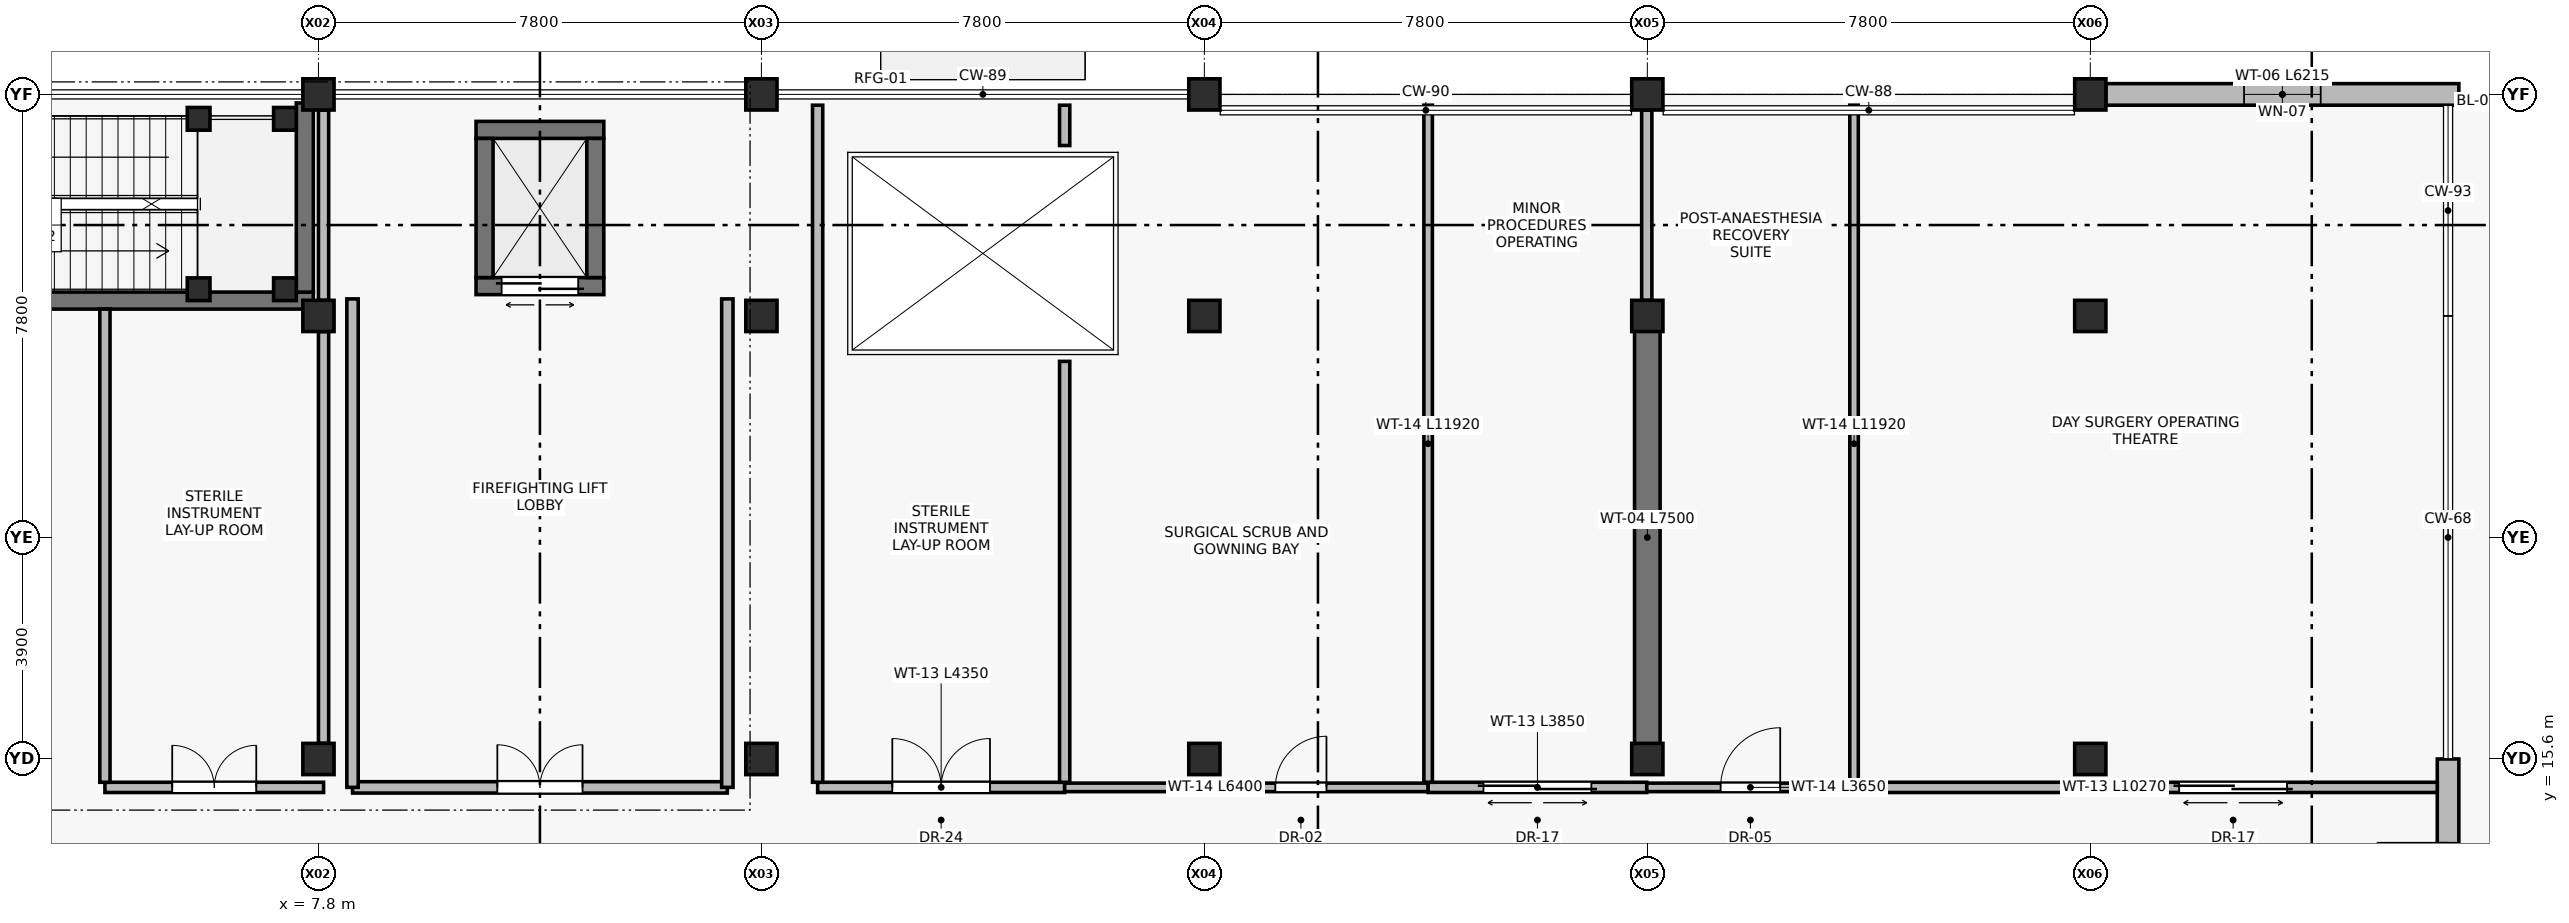
"""IFC4 building model, lengths in metres.
Left out: names, types, materials, properties, quantities, classifications, styles, units other than length and angle.
Written with IfcOpenShell. Run it as: python <this file> out.ifc"""

import sys

from ifc_helpers import new_model, si_unit, direction, frame, frame_2d, origin, origin_2d, place, context, subcontext, project, spatial, rectangle, extrude, element, fill, save


model = new_model("IFC4")
c1 = context("Model", 3, precision=1e-05, world=origin(), true_north=direction((0.0, 1.0)))
c2 = subcontext(c1, "Body", "Model", "MODEL_VIEW")
j1 = project(units=[si_unit("LENGTHUNIT", "METRE"), si_unit("PLANEANGLEUNIT", "RADIAN")], contexts=[c1])
p1 = place(None, origin())
s1 = spatial("IfcSite", under=j1, at=p1, CompositionType="ELEMENT")
p2 = place(p1, origin())
s2 = spatial("IfcBuilding", under=s1, at=p2, CompositionType="ELEMENT")
p3 = place(p2, frame((0.0, 0.0, 9.6)))
s3 = spatial("IfcBuildingStorey", under=s2, at=p3, CompositionType="ELEMENT", Elevation=9.6)
for number, where, z_axis, x_axis in (
    (1, (7.8, 15.6, 0.0), (0.0, 0.0, 1.0), (1.0, 0.0, 0.0)),
    (2, (7.8, 23.4, 0.0), (0.0, 0.0, 1.0), (1.0, 0.0, 0.0)),
    (3, (7.8, 27.3, 0.0), (0.0, 0.0, 1.0), (1.0, 0.0, 0.0)),
    (4, (15.6, 15.6, 0.0), (0.0, 0.0, 1.0), (1.0, 0.0, 0.0)),
    (5, (15.6, 23.4, 0.0), (0.0, 0.0, 1.0), (1.0, 0.0, 0.0)),
    (6, (15.6, 27.3, 0.0), (0.0, 0.0, 1.0), (1.0, 0.0, 0.0)),
    (7, (23.4, 15.6, 0.0), (0.0, 0.0, 1.0), (1.0, 0.0, 0.0)),
    (8, (23.4, 23.4, 0.0), (0.0, 0.0, 1.0), (1.0, 0.0, 0.0)),
    (9, (23.4, 27.3, 0.0), (0.0, 0.0, 1.0), (1.0, 0.0, 0.0)),
    (10, (31.2, 15.6, 0.0), (0.0, 0.0, 1.0), (1.0, 0.0, 0.0)),
    (11, (31.2, 23.4, 0.0), (0.0, 0.0, 1.0), (1.0, 0.0, 0.0)),
    (12, (31.2, 27.3, 0.0), (0.0, 0.0, 1.0), (1.0, 0.0, 0.0)),
    (13, (39.0, 15.6, 0.0), (0.0, 0.0, 1.0), (1.0, 0.0, 0.0)),
    (14, (39.0, 23.4, 0.0), (0.0, 0.0, 1.0), (1.0, 0.0, 0.0)),
    (15, (39.0, 27.3, 0.0), (0.0, 0.0, 1.0), (1.0, 0.0, 0.0)),
):
    element("IfcColumn", number, at=place(p3, frame(where, z_axis=z_axis, x_axis=x_axis)), inside=s3, PredefinedType="COLUMN", context=c2, shape_type="SweptSolid", body=[
        extrude(rectangle(XDim=0.55, YDim=0.55, at=origin_2d()), origin(), (0.0, 0.0, 1.0), 4.5),
    ])
for number, where, z_axis, x_axis in (
    (16, (5.69, 23.87, 0.0), (0.0, 0.0, 1.0), (1.0, 0.0, 0.0)),
    (17, (5.69, 26.87, 0.0), (0.0, 0.0, 1.0), (1.0, 0.0, 0.0)),
    (18, (7.21, 23.87, 0.0), (0.0, 0.0, 1.0), (1.0, 0.0, 0.0)),
    (19, (7.21, 26.87, 0.0), (0.0, 0.0, 1.0), (1.0, 0.0, 0.0)),
):
    element("IfcColumn", number, at=place(p3, frame(where, z_axis=z_axis, x_axis=x_axis)), inside=s3, PredefinedType="COLUMN", context=c2, shape_type="SweptSolid", body=[
        extrude(rectangle(XDim=0.4, YDim=0.4, at=origin_2d()), origin(), (0.0, 0.0, 1.0), 4.5),
    ])
p4 = place(p3, frame((39.275, 27.3, 0.0), z_axis=(0.0, 0.0, 1.0), x_axis=(1.0, 0.0, 0.0)))
e20 = element("IfcWall", 20, at=p4, inside=s3, PredefinedType="STANDARD", context=c2, shape_type="SweptSolid", body=[
    extrude(rectangle(XDim=6.215, YDim=0.38, at=frame_2d((3.107, 0.0))), origin(), (0.0, 0.0, 1.0), 3.84),
])
p5 = place(p4, frame((2.433, 0.0, 0.9)))
e21 = element("IfcOpeningElement", 21, at=p5, cuts=e20, PredefinedType="OPENING", context=c2, shape_type="SweptSolid", body=[
    extrude(rectangle(XDim=1.35, YDim=1.75, at=frame_2d((0.675, 0.875))), frame((0.0, 0.2, 0.0), z_axis=(0.0, -1.0, 0.0), x_axis=(1.0, 0.0, 0.0)), (0.0, 0.0, 1.0), 0.4),
])
p6 = place(p3, frame((45.3, 15.6, 0.0), z_axis=(0.0, 0.0, 1.0), x_axis=(0.0, -1.0, 0.0)))
e22 = element("IfcWall", 22, at=p6, inside=s3, PredefinedType="STANDARD", context=c2, shape_type="SweptSolid", body=[
    extrude(rectangle(XDim=7.8, YDim=0.38, at=frame_2d((3.9, 0.0))), origin(), (0.0, 0.0, 1.0), 4.24),
])
p7 = place(p6, frame((1.475, 0.0, 0.0)))
e23 = element("IfcOpeningElement", 23, at=p7, cuts=e22, PredefinedType="OPENING", context=c2, shape_type="SweptSolid", body=[
    extrude(rectangle(XDim=1.25, YDim=2.2, at=frame_2d((0.625, 1.1))), frame((0.0, 0.2, 0.0), z_axis=(0.0, -1.0, 0.0), x_axis=(1.0, 0.0, 0.0)), (0.0, 0.0, 1.0), 0.4),
])
p8 = place(p3, frame((0.15, 23.67, 0.0), z_axis=(0.0, 0.0, 1.0), x_axis=(1.0, 0.0, 0.0)))
e24 = element("IfcWall", 24, at=p8, inside=s3, PredefinedType="SHEAR", context=c2, shape_type="SweptSolid", body=[
    extrude(rectangle(XDim=7.56, YDim=0.3, at=frame_2d((3.78, 0.0))), origin(), (0.0, 0.0, 1.0), 4.24),
])
p9 = place(p8, frame((0.56, 0.0, 0.0)))
e25 = element("IfcOpeningElement", 25, at=p9, cuts=e24, PredefinedType="OPENING", context=c2, shape_type="SweptSolid", body=[
    extrude(rectangle(XDim=1.4, YDim=2.2, at=frame_2d((0.7, 1.1))), frame((0.0, 0.16, 0.0), z_axis=(0.0, -1.0, 0.0), x_axis=(1.0, 0.0, 0.0)), (0.0, 0.0, 1.0), 0.32),
])
p10 = place(p3, frame((7.56, 23.82, 0.0), z_axis=(0.0, 0.0, 1.0), x_axis=(0.0, 1.0, 0.0)))
e26 = element("IfcWall", 26, at=p10, inside=s3, PredefinedType="SHEAR", context=c2, shape_type="SweptSolid", body=[
    extrude(rectangle(XDim=3.33, YDim=0.3, at=frame_2d((1.665, 0.0))), origin(), (0.0, 0.0, 1.0), 4.24),
])
p11 = place(p3, frame((10.575, 23.925, 0.0), z_axis=(0.0, 0.0, 1.0), x_axis=(1.0, 0.0, 0.0)))
e27 = element("IfcWall", 27, at=p11, inside=s3, PredefinedType="SHEAR", context=c2, shape_type="SweptSolid", body=[
    extrude(rectangle(XDim=2.25, YDim=0.3, at=frame_2d((1.125, 0.0))), origin(), (0.0, 0.0, 1.0), 4.24),
])
p12 = place(p11, frame((0.45, 0.0, 0.0)))
e28 = element("IfcOpeningElement", 28, at=p12, cuts=e27, PredefinedType="OPENING", context=c2, shape_type="SweptSolid", body=[
    extrude(rectangle(XDim=1.35, YDim=2.3, at=frame_2d((0.675, 1.15))), frame((0.0, 0.16, 0.0), z_axis=(0.0, -1.0, 0.0), x_axis=(1.0, 0.0, 0.0)), (0.0, 0.0, 1.0), 0.32),
])
p13 = place(p3, frame((12.825, 26.675, 0.0), z_axis=(0.0, 0.0, 1.0), x_axis=(-1.0, 0.0, 0.0)))
e29 = element("IfcWall", 29, at=p13, inside=s3, PredefinedType="SHEAR", context=c2, shape_type="SweptSolid", body=[
    extrude(rectangle(XDim=2.25, YDim=0.3, at=frame_2d((1.125, 0.0))), origin(), (0.0, 0.0, 1.0), 4.24),
])
for number, where, z_axis, x_axis in (
    (30, (10.725, 26.525, 0.0), (0.0, 0.0, 1.0), (0.0, -1.0, 0.0)),
    (31, (12.675, 24.075, 0.0), (0.0, 0.0, 1.0), (0.0, 1.0, 0.0)),
):
    element("IfcWall", number, at=place(p3, frame(where, z_axis=z_axis, x_axis=x_axis)), inside=s3, PredefinedType="SHEAR", context=c2, shape_type="SweptSolid", body=[
        extrude(rectangle(XDim=2.45, YDim=0.3, at=frame_2d((1.225, 0.0))), origin(), (0.0, 0.0, 1.0), 4.24),
    ])
p14 = place(p3, frame((8.4, 15.1, 0.0), z_axis=(0.0, 0.0, 1.0), x_axis=(1.0, 0.0, 0.0)))
e32 = element("IfcWall", 32, at=p14, inside=s3, PredefinedType="SOLIDWALL", context=c2, shape_type="SweptSolid", body=[
    extrude(rectangle(XDim=6.6, YDim=0.2, at=frame_2d((3.3, 0.0))), origin(), (0.0, 0.0, 1.0), 4.24),
])
p15 = place(p14, frame((2.55, 0.0, 0.0)))
e33 = element("IfcOpeningElement", 33, at=p15, cuts=e32, PredefinedType="OPENING", context=c2, shape_type="SweptSolid", body=[
    extrude(rectangle(XDim=1.5, YDim=2.2, at=frame_2d((0.75, 1.1))), frame((0.0, 0.11, 0.0), z_axis=(0.0, -1.0, 0.0), x_axis=(1.0, 0.0, 0.0)), (0.0, 0.0, 1.0), 0.22),
])
for number, where, z_axis, x_axis in (
    (34, (8.4, 23.7, 0.0), (0.0, 0.0, 1.0), (0.0, -1.0, 0.0)),
    (35, (15.0, 15.1, 0.0), (0.0, 0.0, 1.0), (0.0, 1.0, 0.0)),
):
    element("IfcWall", number, at=place(p3, frame(where, z_axis=z_axis, x_axis=x_axis)), inside=s3, PredefinedType="SOLIDWALL", context=c2, shape_type="SweptSolid", body=[
        extrude(rectangle(XDim=8.6, YDim=0.2, at=frame_2d((4.3, 0.0))), origin(), (0.0, 0.0, 1.0), 4.24),
    ])
p16 = place(p3, frame((31.2, 15.75, 0.0), z_axis=(0.0, 0.0, 1.0), x_axis=(0.0, 1.0, 0.0)))
e36 = element("IfcWall", 36, at=p16, inside=s3, PredefinedType="SHEAR", context=c2, shape_type="SweptSolid", body=[
    extrude(rectangle(XDim=7.5, YDim=0.45, at=frame_2d((3.75, 0.0))), origin(), (0.0, 0.0, 1.0), 4.24),
])
p17 = place(p3, frame((4.04, 15.1, 0.0), z_axis=(0.0, 0.0, 1.0), x_axis=(1.0, 0.0, 0.0)))
e37 = element("IfcWall", 37, at=p17, inside=s3, PredefinedType="PARTITIONING", context=c2, shape_type="SweptSolid", body=[
    extrude(rectangle(XDim=3.85, YDim=0.18, at=frame_2d((1.925, 0.0))), origin(), (0.0, 0.0, 1.0), 4.24),
])
p18 = place(p17, frame((1.185, 0.0, 0.0)))
e38 = element("IfcOpeningElement", 38, at=p18, cuts=e37, PredefinedType="OPENING", context=c2, shape_type="SweptSolid", body=[
    extrude(rectangle(XDim=1.48, YDim=2.25, at=frame_2d((0.74, 1.125))), frame((0.0, 0.1, 0.0), z_axis=(0.0, -1.0, 0.0), x_axis=(1.0, 0.0, 0.0)), (0.0, 0.0, 1.0), 0.2),
])
p19 = place(p3, frame((16.59, 15.1, 0.0), z_axis=(0.0, 0.0, 1.0), x_axis=(1.0, 0.0, 0.0)))
e39 = element("IfcWall", 39, at=p19, inside=s3, PredefinedType="PARTITIONING", context=c2, shape_type="SweptSolid", body=[
    extrude(rectangle(XDim=4.35, YDim=0.18, at=frame_2d((2.175, 0.0))), origin(), (0.0, 0.0, 1.0), 4.24),
])
p20 = place(p19, frame((1.315, 0.0, 0.0)))
e40 = element("IfcOpeningElement", 40, at=p20, cuts=e39, PredefinedType="OPENING", context=c2, shape_type="SweptSolid", body=[
    extrude(rectangle(XDim=1.72, YDim=2.3, at=frame_2d((0.86, 1.15))), frame((0.0, 0.1, 0.0), z_axis=(0.0, -1.0, 0.0), x_axis=(1.0, 0.0, 0.0)), (0.0, 0.0, 1.0), 0.2),
])
p21 = place(p3, frame((20.94, 15.1, 0.0), z_axis=(0.0, 0.0, 1.0), x_axis=(1.0, 0.0, 0.0)))
e41 = element("IfcWall", 41, at=p21, inside=s3, PredefinedType="PARTITIONING", context=c2, shape_type="SweptSolid", body=[
    extrude(rectangle(XDim=6.4, YDim=0.15, at=frame_2d((3.2, 0.0))), origin(), (0.0, 0.0, 1.0), 4.24),
])
p22 = place(p21, frame((3.71, 0.0, 0.0)))
e42 = element("IfcOpeningElement", 42, at=p22, cuts=e41, PredefinedType="OPENING", context=c2, shape_type="SweptSolid", body=[
    extrude(rectangle(XDim=0.9, YDim=2.1, at=frame_2d((0.45, 1.05))), frame((0.0, 0.085, 0.0), z_axis=(0.0, -1.0, 0.0), x_axis=(1.0, 0.0, 0.0)), (0.0, 0.0, 1.0), 0.17),
])
p23 = place(p3, frame((27.34, 15.1, 0.0), z_axis=(0.0, 0.0, 1.0), x_axis=(1.0, 0.0, 0.0)))
e43 = element("IfcWall", 43, at=p23, inside=s3, PredefinedType="PARTITIONING", context=c2, shape_type="SweptSolid", body=[
    extrude(rectangle(XDim=3.85, YDim=0.18, at=frame_2d((1.925, 0.0))), origin(), (0.0, 0.0, 1.0), 4.24),
])
p24 = place(p23, frame((0.975, 0.0, 0.0)))
e44 = element("IfcOpeningElement", 44, at=p24, cuts=e43, PredefinedType="OPENING", context=c2, shape_type="SweptSolid", body=[
    extrude(rectangle(XDim=1.9, YDim=2.3, at=frame_2d((0.95, 1.15))), frame((0.0, 0.1, 0.0), z_axis=(0.0, -1.0, 0.0), x_axis=(1.0, 0.0, 0.0)), (0.0, 0.0, 1.0), 0.2),
])
p25 = place(p3, frame((31.19, 15.1, 0.0), z_axis=(0.0, 0.0, 1.0), x_axis=(1.0, 0.0, 0.0)))
e45 = element("IfcWall", 45, at=p25, inside=s3, PredefinedType="PARTITIONING", context=c2, shape_type="SweptSolid", body=[
    extrude(rectangle(XDim=3.65, YDim=0.15, at=frame_2d((1.825, 0.0))), origin(), (0.0, 0.0, 1.0), 4.24),
])
p26 = place(p25, frame((1.3, 0.0, 0.0)))
e46 = element("IfcOpeningElement", 46, at=p26, cuts=e45, PredefinedType="OPENING", context=c2, shape_type="SweptSolid", body=[
    extrude(rectangle(XDim=1.05, YDim=2.15, at=frame_2d((0.525, 1.075))), frame((0.0, 0.085, 0.0), z_axis=(0.0, -1.0, 0.0), x_axis=(1.0, 0.0, 0.0)), (0.0, 0.0, 1.0), 0.17),
])
p27 = place(p3, frame((34.84, 15.1, 0.0), z_axis=(0.0, 0.0, 1.0), x_axis=(1.0, 0.0, 0.0)))
e47 = element("IfcWall", 47, at=p27, inside=s3, PredefinedType="PARTITIONING", context=c2, shape_type="SweptSolid", body=[
    extrude(rectangle(XDim=10.27, YDim=0.18, at=frame_2d((5.135, 0.0))), origin(), (0.0, 0.0, 1.0), 4.24),
])
p28 = place(p27, frame((5.726, 0.0, 0.0)))
e48 = element("IfcOpeningElement", 48, at=p28, cuts=e47, PredefinedType="OPENING", context=c2, shape_type="SweptSolid", body=[
    extrude(rectangle(XDim=1.9, YDim=2.3, at=frame_2d((0.95, 1.15))), frame((0.0, 0.1, 0.0), z_axis=(0.0, -1.0, 0.0), x_axis=(1.0, 0.0, 0.0)), (0.0, 0.0, 1.0), 0.2),
])
p29 = place(p3, frame((4.04, 15.19, 0.0), z_axis=(0.0, 0.0, 1.0), x_axis=(0.0, 1.0, 0.0)))
e49 = element("IfcWall", 49, at=p29, inside=s3, PredefinedType="PARTITIONING", context=c2, shape_type="SweptSolid", body=[
    extrude(rectangle(XDim=8.33, YDim=0.18, at=frame_2d((4.165, 0.0))), origin(), (0.0, 0.0, 1.0), 4.24),
])
p30 = place(p3, frame((7.89, 15.875, 0.0), z_axis=(0.0, 0.0, 1.0), x_axis=(0.0, 1.0, 0.0)))
e50 = element("IfcWall", 50, at=p30, inside=s3, PredefinedType="PARTITIONING", context=c2, shape_type="SweptSolid", body=[
    extrude(rectangle(XDim=7.25, YDim=0.18, at=frame_2d((3.625, 0.0))), origin(), (0.0, 0.0, 1.0), 3.79),
])
p31 = place(p3, frame((7.89, 23.675, 0.0), z_axis=(0.0, 0.0, 1.0), x_axis=(0.0, 1.0, 0.0)))
e51 = element("IfcWall", 51, at=p31, inside=s3, PredefinedType="PARTITIONING", context=c2, shape_type="SweptSolid", body=[
    extrude(rectangle(XDim=3.35, YDim=0.18, at=frame_2d((1.675, 0.0))), origin(), (0.0, 0.0, 1.0), 3.79),
])
p32 = place(p3, frame((16.59, 15.19, 0.0), z_axis=(0.0, 0.0, 1.0), x_axis=(0.0, 1.0, 0.0)))
e52 = element("IfcWall", 52, at=p32, inside=s3, PredefinedType="PARTITIONING", context=c2, shape_type="SweptSolid", body=[
    extrude(rectangle(XDim=11.92, YDim=0.18, at=frame_2d((5.96, 0.0))), origin(), (0.0, 0.0, 1.0), 4.24),
])
p33 = place(p3, frame((20.94, 15.19, 0.0), z_axis=(0.0, 0.0, 1.0), x_axis=(0.0, 1.0, 0.0)))
e53 = element("IfcWall", 53, at=p33, inside=s3, PredefinedType="PARTITIONING", context=c2, shape_type="SweptSolid", body=[
    extrude(rectangle(XDim=7.41, YDim=0.18, at=frame_2d((3.705, 0.0))), origin(), (0.0, 0.0, 1.0), 3.94),
])
p34 = place(p3, frame((20.94, 26.4, 0.0), z_axis=(0.0, 0.0, 1.0), x_axis=(0.0, 1.0, 0.0)))
e54 = element("IfcWall", 54, at=p34, inside=s3, PredefinedType="PARTITIONING", context=c2, shape_type="SweptSolid", body=[
    extrude(rectangle(XDim=0.71, YDim=0.18, at=frame_2d((0.355, 0.0))), origin(), (0.0, 0.0, 1.0), 3.94),
])
p35 = place(p3, frame((27.34, 15.19, 0.0), z_axis=(0.0, 0.0, 1.0), x_axis=(0.0, 1.0, 0.0)))
e55 = element("IfcWall", 55, at=p35, inside=s3, PredefinedType="PARTITIONING", context=c2, shape_type="SweptSolid", body=[
    extrude(rectangle(XDim=11.92, YDim=0.15, at=frame_2d((5.96, 0.0))), origin(), (0.0, 0.0, 1.0), 4.24),
])
p36 = place(p3, frame((31.19, 23.675, 0.0), z_axis=(0.0, 0.0, 1.0), x_axis=(0.0, 1.0, 0.0)))
e56 = element("IfcWall", 56, at=p36, inside=s3, PredefinedType="PARTITIONING", context=c2, shape_type="SweptSolid", body=[
    extrude(rectangle(XDim=3.35, YDim=0.18, at=frame_2d((1.675, 0.0))), origin(), (0.0, 0.0, 1.0), 3.79),
])
p37 = place(p3, frame((34.84, 15.19, 0.0), z_axis=(0.0, 0.0, 1.0), x_axis=(0.0, 1.0, 0.0)))
e57 = element("IfcWall", 57, at=p37, inside=s3, PredefinedType="PARTITIONING", context=c2, shape_type="SweptSolid", body=[
    extrude(rectangle(XDim=11.92, YDim=0.15, at=frame_2d((5.96, 0.0))), origin(), (0.0, 0.0, 1.0), 4.24),
])
p38 = place(p5, origin())
e58 = element("IfcWindow", 58, at=p38, inside=s3, PartitioningType="SINGLE_PANEL", PredefinedType="WINDOW", context=c2, shape_type="SweptSolid", body=[
    extrude(rectangle(XDim=1.35, YDim=1.75, at=frame_2d((0.675, 0.875))), frame((0.0, 0.03, 0.0), z_axis=(0.0, -1.0, 0.0), x_axis=(1.0, 0.0, 0.0)), (0.0, 0.0, 1.0), 0.06),
])
fill(e21, e58)
p39 = place(p7, frame((1.25, 0.0, 0.0), z_axis=(0.0, 0.0, 1.0), x_axis=(-1.0, 0.0, 0.0)))
e59 = element("IfcDoor", 59, at=p39, inside=s3, OperationType="SINGLE_SWING_LEFT", PredefinedType="DOOR", context=c2, shape_type="SweptSolid", body=[
    extrude(rectangle(XDim=1.25, YDim=2.2, at=frame_2d((0.625, 1.1))), frame((0.0, 0.025, 0.0), z_axis=(0.0, -1.0, 0.0), x_axis=(1.0, 0.0, 0.0)), (0.0, 0.0, 1.0), 0.05),
])
fill(e23, e59)
p40 = place(p12, origin())
e60 = element("IfcDoor", 60, at=p40, inside=s3, OperationType="DOUBLE_DOOR_SLIDING", PredefinedType="DOOR", context=c2, shape_type="SweptSolid", body=[
    extrude(rectangle(XDim=1.35, YDim=2.3, at=frame_2d((0.675, 1.15))), frame((0.0, 0.025, 0.0), z_axis=(0.0, -1.0, 0.0), x_axis=(1.0, 0.0, 0.0)), (0.0, 0.0, 1.0), 0.05),
])
fill(e28, e60)
p41 = place(p15, origin())
e61 = element("IfcDoor", 61, at=p41, inside=s3, OperationType="DOUBLE_DOOR_SINGLE_SWING", PredefinedType="DOOR", context=c2, shape_type="SweptSolid", body=[
    extrude(rectangle(XDim=1.5, YDim=2.2, at=frame_2d((0.75, 1.1))), frame((0.0, 0.025, 0.0), z_axis=(0.0, -1.0, 0.0), x_axis=(1.0, 0.0, 0.0)), (0.0, 0.0, 1.0), 0.05),
])
fill(e33, e61)
p42 = place(p18, origin())
e62 = element("IfcDoor", 62, at=p42, inside=s3, OperationType="DOUBLE_DOOR_SINGLE_SWING", PredefinedType="DOOR", context=c2, shape_type="SweptSolid", body=[
    extrude(rectangle(XDim=1.48, YDim=2.25, at=frame_2d((0.74, 1.125))), frame((0.0, 0.025, 0.0), z_axis=(0.0, -1.0, 0.0), x_axis=(1.0, 0.0, 0.0)), (0.0, 0.0, 1.0), 0.05),
])
fill(e38, e62)
p43 = place(p20, origin())
e63 = element("IfcDoor", 63, at=p43, inside=s3, OperationType="DOUBLE_DOOR_SINGLE_SWING", PredefinedType="DOOR", context=c2, shape_type="SweptSolid", body=[
    extrude(rectangle(XDim=1.72, YDim=2.3, at=frame_2d((0.86, 1.15))), frame((0.0, 0.025, 0.0), z_axis=(0.0, -1.0, 0.0), x_axis=(1.0, 0.0, 0.0)), (0.0, 0.0, 1.0), 0.05),
])
fill(e40, e63)
p44 = place(p22, origin())
e64 = element("IfcDoor", 64, at=p44, inside=s3, OperationType="SINGLE_SWING_RIGHT", PredefinedType="DOOR", context=c2, shape_type="SweptSolid", body=[
    extrude(rectangle(XDim=0.9, YDim=2.1, at=frame_2d((0.45, 1.05))), frame((0.0, 0.025, 0.0), z_axis=(0.0, -1.0, 0.0), x_axis=(1.0, 0.0, 0.0)), (0.0, 0.0, 1.0), 0.05),
])
fill(e42, e64)
p45 = place(p24, origin())
e65 = element("IfcDoor", 65, at=p45, inside=s3, OperationType="DOUBLE_DOOR_SLIDING", PredefinedType="DOOR", context=c2, shape_type="SweptSolid", body=[
    extrude(rectangle(XDim=1.9, YDim=2.3, at=frame_2d((0.95, 1.15))), frame((0.0, 0.025, 0.0), z_axis=(0.0, -1.0, 0.0), x_axis=(1.0, 0.0, 0.0)), (0.0, 0.0, 1.0), 0.05),
])
fill(e44, e65)
p46 = place(p26, origin())
e66 = element("IfcDoor", 66, at=p46, inside=s3, OperationType="SINGLE_SWING_RIGHT", PredefinedType="DOOR", context=c2, shape_type="SweptSolid", body=[
    extrude(rectangle(XDim=1.05, YDim=2.15, at=frame_2d((0.525, 1.075))), frame((0.0, 0.025, 0.0), z_axis=(0.0, -1.0, 0.0), x_axis=(1.0, 0.0, 0.0)), (0.0, 0.0, 1.0), 0.05),
])
fill(e46, e66)
p47 = place(p28, origin())
e67 = element("IfcDoor", 67, at=p47, inside=s3, OperationType="DOUBLE_DOOR_SLIDING", PredefinedType="DOOR", context=c2, shape_type="SweptSolid", body=[
    extrude(rectangle(XDim=1.9, YDim=2.3, at=frame_2d((0.95, 1.15))), frame((0.0, 0.025, 0.0), z_axis=(0.0, -1.0, 0.0), x_axis=(1.0, 0.0, 0.0)), (0.0, 0.0, 1.0), 0.05),
])
fill(e48, e67)
save(model, sys.argv[1])
